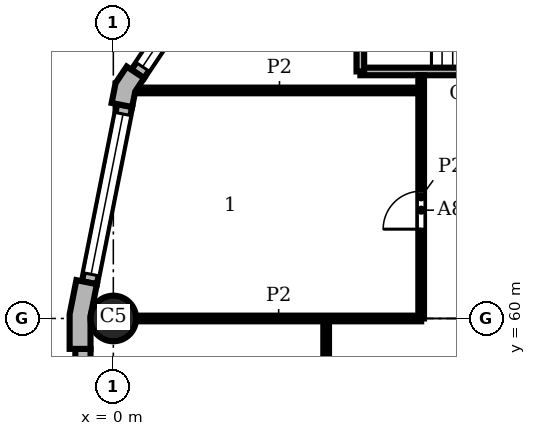
"""IFC4 building model, lengths in metres.
Left out: names, types, materials, properties, quantities, classifications, styles, units other than length and angle.
Written with IfcOpenShell. Run it as: python <this file> out.ifc"""

import sys

from ifc_helpers import new_model, si_unit, direction, frame, frame_2d, origin, origin_2d, place, context, subcontext, project, spatial, polyline, rectangle, circle, outline, extrude, element, fill, save


model = new_model("IFC4")
c1 = context("Model", 3, precision=1e-05, world=origin(), true_north=direction((0.0, 1.0)))
c2 = subcontext(c1, "Body", "Model", "MODEL_VIEW")
j1 = project(units=[si_unit("LENGTHUNIT", "METRE"), si_unit("PLANEANGLEUNIT", "RADIAN")], contexts=[c1])
p1 = place(None, origin())
s1 = spatial("IfcSite", under=j1, at=p1, CompositionType="ELEMENT")
p2 = place(p1, origin())
s2 = spatial("IfcBuilding", under=s1, at=p2, CompositionType="ELEMENT")
p3 = place(p2, frame((0.0, 0.0, 93.9)))
s3 = spatial("IfcBuildingStorey", under=s2, at=p3, CompositionType="ELEMENT", Elevation=93.9)
p4 = place(p3, frame((0.0, 60.0, 0.0), z_axis=(0.0, 0.0, 1.0), x_axis=(1.0, 0.0, 0.0)))
e1 = element("IfcColumn", 1, at=p4, inside=s3, PredefinedType="COLUMN", context=c2, shape_type="SweptSolid", body=[
    extrude(circle(Radius=0.6, at=origin_2d()), origin(), (0.0, 0.0, 1.0), 3.9),
])
p5 = place(p3, origin())
e2 = element("IfcWall", 2, at=p5, inside=s3, PredefinedType="SOLIDWALL", context=c2, shape_type="SweptSolid", body=[
    extrude(outline(polyline([(0.477, 66.545), (0.352, 66.629), (0.059, 66.189), (-0.045, 65.67), (0.103, 65.641), (0.495, 65.563), (0.577, 65.974), (0.81, 66.323), (0.477, 66.545)])), origin(), (0.0, 0.0, 1.0), 3.9),
])
e3 = element("IfcWall", 3, at=p5, inside=s3, PredefinedType="SOLIDWALL", context=c2, shape_type="SweptSolid", body=[
    extrude(outline(polyline([(-0.825, 60.98), (-0.972, 61.009), (-1.15, 60.113), (-1.15, 59.2), (-1.0, 59.2), (-0.6, 59.2), (-0.6, 60.059), (-0.432, 60.902), (-0.825, 60.98)])), origin(), (0.0, 0.0, 1.0), 3.9),
])
p6 = place(p3, frame((3.284, 70.386, 0.0), z_axis=(0.0, 0.0, 1.0), x_axis=(-0.555541552266, -0.831488775454, 0.0)))
e4 = element("IfcWall", 4, at=p6, inside=s3, PredefinedType="SOLIDWALL", context=c2, shape_type="SweptSolid", body=[
    extrude(rectangle(XDim=4.753, YDim=0.4, at=frame_2d((2.376, 0.0))), origin(), (0.0, 0.0, 1.0), 3.9),
])
p7 = place(p6, frame((0.226, 0.0, 0.9)))
e5 = element("IfcOpeningElement", 5, at=p7, cuts=e4, PredefinedType="OPENING", context=c2, shape_type="SweptSolid", body=[
    extrude(rectangle(XDim=4.3, YDim=2.35, at=frame_2d((2.15, 1.175))), frame((0.0, 0.21, 0.0), z_axis=(0.0, -1.0, 0.0), x_axis=(1.0, 0.0, 0.0)), (0.0, 0.0, 1.0), 0.42),
])
p8 = place(p3, frame((0.299, 65.602, 0.0), z_axis=(0.0, 0.0, 1.0), x_axis=(-0.195098533057, -0.98078364709, 0.0)))
e6 = element("IfcWall", 6, at=p8, inside=s3, PredefinedType="SOLIDWALL", context=c2, shape_type="SweptSolid", body=[
    extrude(rectangle(XDim=4.753, YDim=0.4, at=frame_2d((2.376, 0.0))), origin(), (0.0, 0.0, 1.0), 3.9),
])
p9 = place(p8, frame((0.226, 0.0, 0.9)))
e7 = element("IfcOpeningElement", 7, at=p9, cuts=e6, PredefinedType="OPENING", context=c2, shape_type="SweptSolid", body=[
    extrude(rectangle(XDim=4.3, YDim=2.35, at=frame_2d((2.15, 1.175))), frame((0.0, 0.21, 0.0), z_axis=(0.0, -1.0, 0.0), x_axis=(1.0, 0.0, 0.0)), (0.0, 0.0, 1.0), 0.42),
])
p10 = place(p3, frame((-0.8, 59.2, 0.0), z_axis=(0.0, 0.0, 1.0), x_axis=(0.0, -1.0, 0.0)))
e8 = element("IfcWall", 8, at=p10, inside=s3, PredefinedType="SOLIDWALL", context=c2, shape_type="SweptSolid", body=[
    extrude(rectangle(XDim=18.4, YDim=0.4, at=frame_2d((9.2, 0.0))), origin(), (0.0, 0.0, 1.0), 3.9),
])
p11 = place(p10, frame((3.75, 0.0, 0.9)))
e9 = element("IfcOpeningElement", 9, at=p11, cuts=e8, PredefinedType="OPENING", context=c2, shape_type="SweptSolid", body=[
    extrude(rectangle(XDim=0.9, YDim=2.35, at=frame_2d((0.45, 1.175))), frame((0.0, 0.21, 0.0), z_axis=(0.0, -1.0, 0.0), x_axis=(1.0, 0.0, 0.0)), (0.0, 0.0, 1.0), 0.42),
])
p12 = place(p10, frame((13.75, 0.0, 0.9)))
e10 = element("IfcOpeningElement", 10, at=p12, cuts=e8, PredefinedType="OPENING", context=c2, shape_type="SweptSolid", body=[
    extrude(rectangle(XDim=0.9, YDim=2.35, at=frame_2d((0.45, 1.175))), frame((0.0, 0.21, 0.0), z_axis=(0.0, -1.0, 0.0), x_axis=(1.0, 0.0, 0.0)), (0.0, 0.0, 1.0), 0.42),
])
p13 = place(p3, frame((6.5, 66.5, 0.0), z_axis=(0.0, 0.0, 1.0), x_axis=(1.0, 0.0, 0.0)))
e11 = element("IfcWall", 11, at=p13, inside=s3, PredefinedType="SHEAR", context=c2, shape_type="SweptSolid", body=[
    extrude(rectangle(XDim=6.6, YDim=0.2, at=frame_2d((3.3, 0.0))), origin(), (0.0, 0.0, 1.0), 3.58),
])
p14 = place(p13, frame((5.225, 0.0, 0.0)))
e12 = element("IfcOpeningElement", 12, at=p14, cuts=e11, PredefinedType="OPENING", context=c2, shape_type="SweptSolid", body=[
    extrude(rectangle(XDim=1.0, YDim=2.1, at=frame_2d((0.5, 1.05))), frame((0.0, 0.11, 0.0), z_axis=(0.0, -1.0, 0.0), x_axis=(1.0, 0.0, 0.0)), (0.0, 0.0, 1.0), 0.22),
])
p15 = place(p3, frame((6.5, 66.5, 0.0), z_axis=(0.0, 0.0, 1.0), x_axis=(0.0, 1.0, 0.0)))
e13 = element("IfcWall", 13, at=p15, inside=s3, PredefinedType="SHEAR", context=c2, shape_type="SweptSolid", body=[
    extrude(rectangle(XDim=3.3, YDim=0.2, at=frame_2d((1.65, 0.0))), origin(), (0.0, 0.0, 1.0), 3.58),
])
p16 = place(p3, frame((5.6, 5.6, 0.0), z_axis=(0.0, 0.0, 1.0), x_axis=(0.0, 1.0, 0.0)))
e14 = element("IfcWall", 14, at=p16, inside=s3, PredefinedType="PARTITIONING", context=c2, shape_type="SweptSolid", body=[
    extrude(rectangle(XDim=54.4, YDim=0.15, at=frame_2d((27.2, 0.0))), origin(), (0.0, 0.0, 1.0), 3.58),
])
p17 = place(p16, frame((5.5, 0.0, 0.0)))
e15 = element("IfcOpeningElement", 15, at=p17, cuts=e14, PredefinedType="OPENING", context=c2, shape_type="SweptSolid", body=[
    extrude(rectangle(XDim=1.0, YDim=2.1, at=frame_2d((0.5, 1.05))), frame((0.0, 0.085, 0.0), z_axis=(0.0, -1.0, 0.0), x_axis=(1.0, 0.0, 0.0)), (0.0, 0.0, 1.0), 0.17),
])
p18 = place(p16, frame((11.75, 0.0, 0.0)))
e16 = element("IfcOpeningElement", 16, at=p18, cuts=e14, PredefinedType="OPENING", context=c2, shape_type="SweptSolid", body=[
    extrude(rectangle(XDim=1.0, YDim=2.1, at=frame_2d((0.5, 1.05))), frame((0.0, 0.085, 0.0), z_axis=(0.0, -1.0, 0.0), x_axis=(1.0, 0.0, 0.0)), (0.0, 0.0, 1.0), 0.17),
])
p19 = place(p16, frame((18.25, 0.0, 0.0)))
e17 = element("IfcOpeningElement", 17, at=p19, cuts=e14, PredefinedType="OPENING", context=c2, shape_type="SweptSolid", body=[
    extrude(rectangle(XDim=1.0, YDim=2.1, at=frame_2d((0.5, 1.05))), frame((0.0, 0.085, 0.0), z_axis=(0.0, -1.0, 0.0), x_axis=(1.0, 0.0, 0.0)), (0.0, 0.0, 1.0), 0.17),
])
p20 = place(p16, frame((29.3, 0.0, 0.0)))
e18 = element("IfcOpeningElement", 18, at=p20, cuts=e14, PredefinedType="OPENING", context=c2, shape_type="SweptSolid", body=[
    extrude(rectangle(XDim=1.0, YDim=2.1, at=frame_2d((0.5, 1.05))), frame((0.0, 0.085, 0.0), z_axis=(0.0, -1.0, 0.0), x_axis=(1.0, 0.0, 0.0)), (0.0, 0.0, 1.0), 0.17),
])
p21 = place(p16, frame((39.75, 0.0, 0.0)))
e19 = element("IfcOpeningElement", 19, at=p21, cuts=e14, PredefinedType="OPENING", context=c2, shape_type="SweptSolid", body=[
    extrude(rectangle(XDim=1.0, YDim=2.1, at=frame_2d((0.5, 1.05))), frame((0.0, 0.085, 0.0), z_axis=(0.0, -1.0, 0.0), x_axis=(1.0, 0.0, 0.0)), (0.0, 0.0, 1.0), 0.17),
])
p22 = place(p16, frame((50.0, 0.0, 0.0)))
e20 = element("IfcOpeningElement", 20, at=p22, cuts=e14, PredefinedType="OPENING", context=c2, shape_type="SweptSolid", body=[
    extrude(rectangle(XDim=1.0, YDim=2.1, at=frame_2d((0.5, 1.05))), frame((0.0, 0.085, 0.0), z_axis=(0.0, -1.0, 0.0), x_axis=(1.0, 0.0, 0.0)), (0.0, 0.0, 1.0), 0.17),
])
p23 = place(p3, frame((8.1, 60.0, 0.0), z_axis=(0.0, 0.0, 1.0), x_axis=(0.0, 1.0, 0.0)))
e21 = element("IfcWall", 21, at=p23, inside=s3, PredefinedType="PARTITIONING", context=c2, shape_type="SweptSolid", body=[
    extrude(rectangle(XDim=6.4, YDim=0.15, at=frame_2d((3.2, 0.0))), origin(), (0.0, 0.0, 1.0), 3.58),
])
p24 = place(p23, frame((2.35, 0.0, 0.0)))
e22 = element("IfcOpeningElement", 22, at=p24, cuts=e21, PredefinedType="OPENING", context=c2, shape_type="SweptSolid", body=[
    extrude(rectangle(XDim=1.0, YDim=2.1, at=frame_2d((0.5, 1.05))), frame((0.0, 0.085, 0.0), z_axis=(0.0, -1.0, 0.0), x_axis=(1.0, 0.0, 0.0)), (0.0, 0.0, 1.0), 0.17),
])
p25 = place(p3, frame((0.6, 60.0, 0.0), z_axis=(0.0, 0.0, 1.0), x_axis=(1.0, 0.0, 0.0)))
e23 = element("IfcWall", 23, at=p25, inside=s3, PredefinedType="PARTITIONING", context=c2, shape_type="SweptSolid", body=[
    extrude(rectangle(XDim=7.5, YDim=0.15, at=frame_2d((3.75, 0.0))), origin(), (0.0, 0.0, 1.0), 3.58),
])
p26 = place(p3, frame((0.644, 66.0, 0.0), z_axis=(0.0, 0.0, 1.0), x_axis=(1.0, 0.0, 0.0)))
e24 = element("IfcWall", 24, at=p26, inside=s3, PredefinedType="PARTITIONING", context=c2, shape_type="SweptSolid", body=[
    extrude(rectangle(XDim=7.456, YDim=0.15, at=frame_2d((3.728, 0.0))), origin(), (0.0, 0.0, 1.0), 3.58),
])
p27 = place(p7, origin())
e25 = element("IfcWindow", 25, at=p27, inside=s3, PartitioningType="SINGLE_PANEL", PredefinedType="WINDOW", context=c2, shape_type="SweptSolid", body=[
    extrude(rectangle(XDim=4.3, YDim=2.35, at=frame_2d((2.15, 1.175))), frame((0.0, 0.16, 0.0), z_axis=(0.0, -1.0, 0.0), x_axis=(1.0, 0.0, 0.0)), (0.0, 0.0, 1.0), 0.06),
])
fill(e5, e25)
p28 = place(p9, origin())
e26 = element("IfcWindow", 26, at=p28, inside=s3, PartitioningType="SINGLE_PANEL", PredefinedType="WINDOW", context=c2, shape_type="SweptSolid", body=[
    extrude(rectangle(XDim=4.3, YDim=2.35, at=frame_2d((2.15, 1.175))), frame((0.0, 0.16, 0.0), z_axis=(0.0, -1.0, 0.0), x_axis=(1.0, 0.0, 0.0)), (0.0, 0.0, 1.0), 0.06),
])
fill(e7, e26)
p29 = place(p24, origin())
e27 = element("IfcDoor", 27, at=p29, inside=s3, OperationType="SINGLE_SWING_LEFT", PredefinedType="DOOR", context=c2, shape_type="SweptSolid", body=[
    extrude(rectangle(XDim=1.0, YDim=2.1, at=frame_2d((0.5, 1.05))), frame((0.0, 0.025, 0.0), z_axis=(0.0, -1.0, 0.0), x_axis=(1.0, 0.0, 0.0)), (0.0, 0.0, 1.0), 0.05),
])
fill(e22, e27)
save(model, sys.argv[1])
